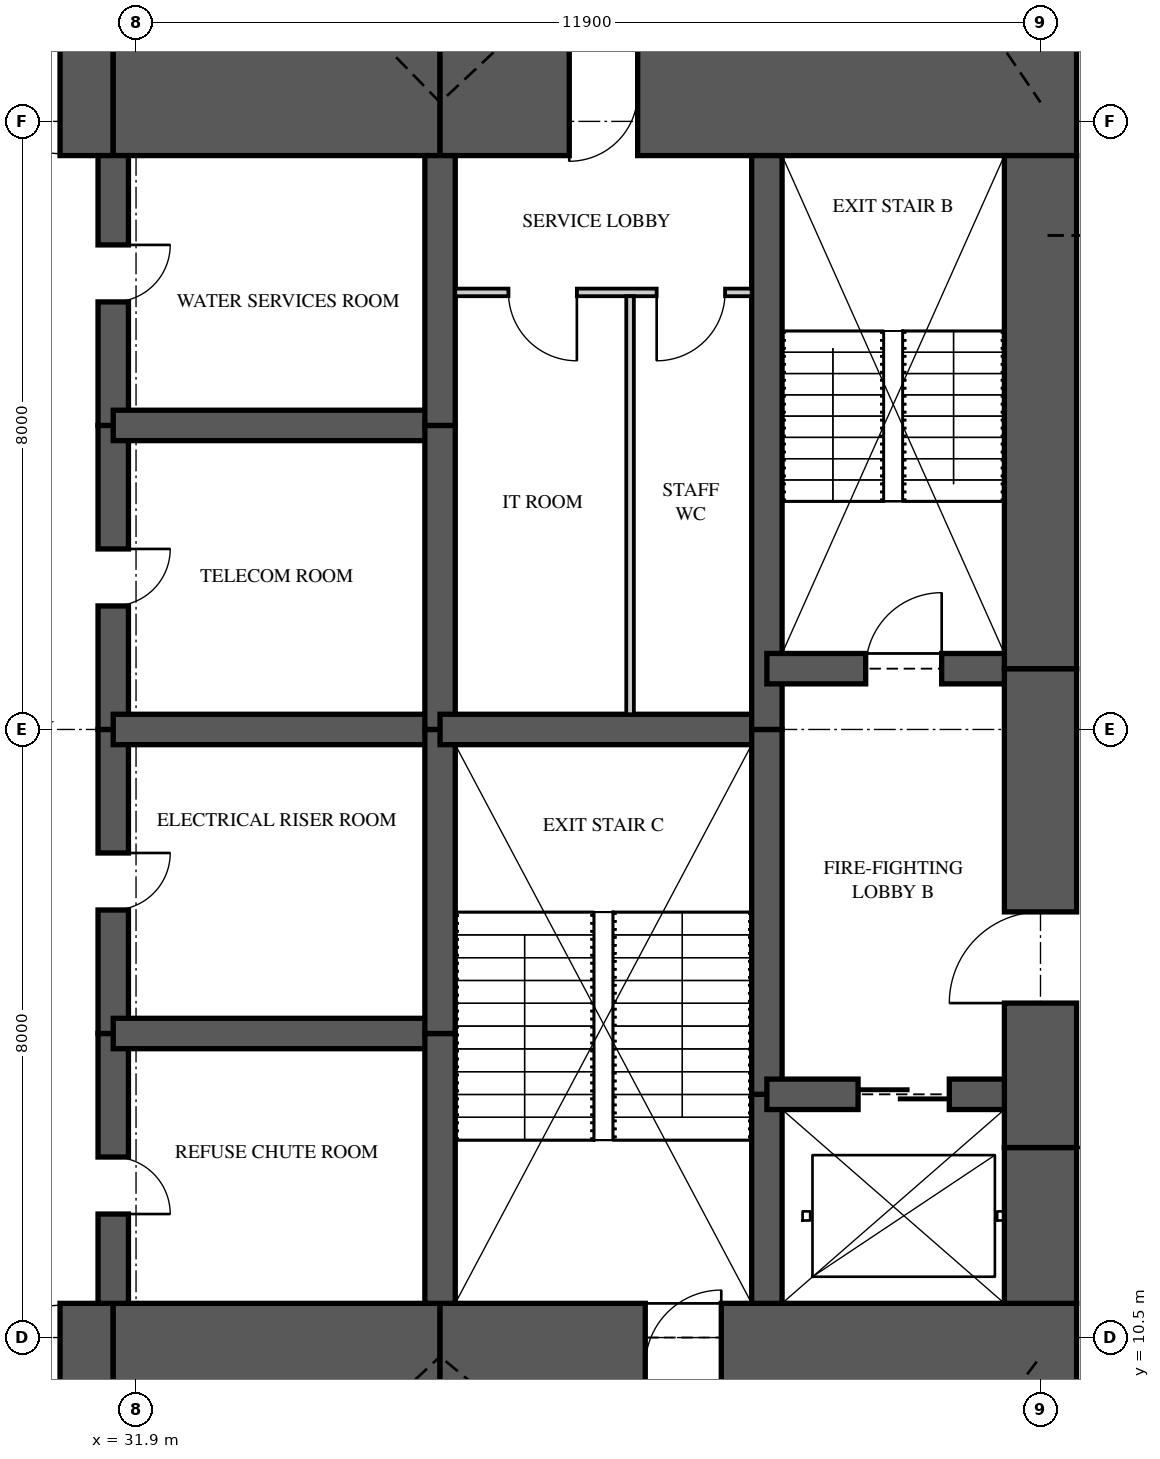
"""IFC4 building model, lengths in metres.
Left out: names, types, materials, properties, quantities, classifications, styles, units other than length and angle.
Written with IfcOpenShell. Run it as: python <this file> out.ifc"""

import sys

from ifc_helpers import new_model, si_unit, direction, frame, frame_2d, origin, place, context, subcontext, project, spatial, rectangle, extrude, element, fill, save


model = new_model("IFC4")
c1 = context("Model", 3, precision=1e-05, world=origin(), true_north=direction((0.0, 1.0)))
c2 = subcontext(c1, "Body", "Model", "MODEL_VIEW")
j1 = project(units=[si_unit("LENGTHUNIT", "METRE"), si_unit("PLANEANGLEUNIT", "RADIAN")], contexts=[c1])
p1 = place(None, origin())
s1 = spatial("IfcSite", under=j1, at=p1, CompositionType="ELEMENT")
p2 = place(p1, origin())
s2 = spatial("IfcBuilding", under=s1, at=p2, CompositionType="ELEMENT")
p3 = place(p2, frame((0.0, 0.0, 74.75)))
s3 = spatial("IfcBuildingStorey", under=s2, at=p3, CompositionType="ELEMENT", Elevation=74.75)
p4 = place(p3, frame((26.0, 10.125, 0.0), z_axis=(0.0, 0.0, 1.0), x_axis=(1.0, 0.0, 0.0)))
e1 = element("IfcWall", 1, at=p4, inside=s3, PredefinedType="SHEAR", context=c2, shape_type="SweptSolid", body=[
    extrude(rectangle(XDim=5.6, YDim=1.65, at=frame_2d((2.8, 0.0))), origin(), (0.0, 0.0, 1.0), 5.0),
])
p5 = place(p4, frame((3.3, 0.0, 0.0)))
e2 = element("IfcOpeningElement", 2, at=p5, cuts=e1, PredefinedType="OPENING", context=c2, shape_type="SweptSolid", body=[
    extrude(rectangle(XDim=1.6, YDim=2.1, at=frame_2d((0.8, 1.05))), frame((0.0, 0.835, 0.0), z_axis=(0.0, -1.0, 0.0), x_axis=(1.0, 0.0, 0.0)), (0.0, 0.0, 1.0), 1.67),
])
p6 = place(p3, frame((31.6, 10.125, 0.0), z_axis=(0.0, 0.0, 1.0), x_axis=(1.0, 0.0, 0.0)))
e3 = element("IfcWall", 3, at=p6, inside=s3, PredefinedType="SHEAR", context=c2, shape_type="SweptSolid", body=[
    extrude(rectangle(XDim=4.3, YDim=1.65, at=frame_2d((2.15, 0.0))), origin(), (0.0, 0.0, 1.0), 5.0),
])
p7 = place(p3, frame((35.9, 10.125, 0.0), z_axis=(0.0, 0.0, 1.0), x_axis=(1.0, 0.0, 0.0)))
e4 = element("IfcWall", 4, at=p7, inside=s3, PredefinedType="SHEAR", context=c2, shape_type="SweptSolid", body=[
    extrude(rectangle(XDim=8.375, YDim=1.65, at=frame_2d((4.188, 0.0))), origin(), (0.0, 0.0, 1.0), 5.0),
])
p8 = place(p7, frame((2.7, 0.0, 0.0)))
e5 = element("IfcOpeningElement", 5, at=p8, cuts=e4, PredefinedType="OPENING", context=c2, shape_type="SweptSolid", body=[
    extrude(rectangle(XDim=1.0, YDim=2.1, at=frame_2d((0.5, 1.05))), frame((0.0, 0.835, 0.0), z_axis=(0.0, -1.0, 0.0), x_axis=(1.0, 0.0, 0.0)), (0.0, 0.0, 1.0), 1.67),
])
p9 = place(p3, frame((44.275, 26.875, 0.0), z_axis=(0.0, 0.0, 1.0), x_axis=(-1.0, 0.0, 0.0)))
e6 = element("IfcWall", 6, at=p9, inside=s3, PredefinedType="SHEAR", context=c2, shape_type="SweptSolid", body=[
    extrude(rectangle(XDim=8.375, YDim=1.65, at=frame_2d((4.188, 0.0))), origin(), (0.0, 0.0, 1.0), 5.0),
])
p10 = place(p9, frame((5.775, 0.0, 0.0)))
e7 = element("IfcOpeningElement", 7, at=p10, cuts=e6, PredefinedType="OPENING", context=c2, shape_type="SweptSolid", body=[
    extrude(rectangle(XDim=0.9, YDim=2.1, at=frame_2d((0.45, 1.05))), frame((0.0, 0.835, 0.0), z_axis=(0.0, -1.0, 0.0), x_axis=(1.0, 0.0, 0.0)), (0.0, 0.0, 1.0), 1.67),
])
p11 = place(p3, frame((35.9, 26.875, 0.0), z_axis=(0.0, 0.0, 1.0), x_axis=(-1.0, 0.0, 0.0)))
e8 = element("IfcWall", 8, at=p11, inside=s3, PredefinedType="SHEAR", context=c2, shape_type="SweptSolid", body=[
    extrude(rectangle(XDim=4.3, YDim=1.65, at=frame_2d((2.15, 0.0))), origin(), (0.0, 0.0, 1.0), 5.0),
])
p12 = place(p3, frame((31.6, 26.875, 0.0), z_axis=(0.0, 0.0, 1.0), x_axis=(-1.0, 0.0, 0.0)))
e9 = element("IfcWall", 9, at=p12, inside=s3, PredefinedType="SHEAR", context=c2, shape_type="SweptSolid", body=[
    extrude(rectangle(XDim=5.6, YDim=1.65, at=frame_2d((2.8, 0.0))), origin(), (0.0, 0.0, 1.0), 5.0),
])
p13 = place(p12, frame((0.7, 0.0, 0.0)))
e10 = element("IfcOpeningElement", 10, at=p13, cuts=e9, PredefinedType="OPENING", context=c2, shape_type="SweptSolid", body=[
    extrude(rectangle(XDim=1.6, YDim=2.1, at=frame_2d((0.8, 1.05))), frame((0.0, 0.835, 0.0), z_axis=(0.0, -1.0, 0.0), x_axis=(1.0, 0.0, 0.0)), (0.0, 0.0, 1.0), 1.67),
])
p14 = place(p3, frame((43.8, 10.95, 0.0), z_axis=(0.0, 0.0, 1.0), x_axis=(0.0, 1.0, 0.0)))
e11 = element("IfcWall", 11, at=p14, inside=s3, PredefinedType="SHEAR", context=c2, shape_type="SweptSolid", body=[
    extrude(rectangle(XDim=2.05, YDim=0.95, at=frame_2d((1.025, 0.0))), origin(), (0.0, 0.0, 1.0), 5.0),
])
p15 = place(p3, frame((43.8, 13.0, 0.0), z_axis=(0.0, 0.0, 1.0), x_axis=(0.0, 1.0, 0.0)))
e12 = element("IfcWall", 12, at=p15, inside=s3, PredefinedType="SHEAR", context=c2, shape_type="SweptSolid", body=[
    extrude(rectangle(XDim=6.3, YDim=0.95, at=frame_2d((3.15, 0.0))), origin(), (0.0, 0.0, 1.0), 5.0),
])
p16 = place(p15, frame((1.9, 0.0, 0.0)))
e13 = element("IfcOpeningElement", 13, at=p16, cuts=e12, PredefinedType="OPENING", context=c2, shape_type="SweptSolid", body=[
    extrude(rectangle(XDim=1.2, YDim=2.2, at=frame_2d((0.6, 1.1))), frame((0.0, 0.485, 0.0), z_axis=(0.0, -1.0, 0.0), x_axis=(1.0, 0.0, 0.0)), (0.0, 0.0, 1.0), 0.97),
])
p17 = place(p3, frame((43.8, 19.3, 0.0), z_axis=(0.0, 0.0, 1.0), x_axis=(0.0, 1.0, 0.0)))
e14 = element("IfcWall", 14, at=p17, inside=s3, PredefinedType="SHEAR", context=c2, shape_type="SweptSolid", body=[
    extrude(rectangle(XDim=6.75, YDim=0.95, at=frame_2d((3.375, 0.0))), origin(), (0.0, 0.0, 1.0), 5.0),
])
p18 = place(p3, frame((31.6, 10.95, 0.0), z_axis=(0.0, 0.0, 1.0), x_axis=(0.0, 1.0, 0.0)))
e15 = element("IfcWall", 15, at=p18, inside=s3, PredefinedType="SHEAR", context=c2, shape_type="SweptSolid", body=[
    extrude(rectangle(XDim=3.55, YDim=0.4, at=frame_2d((1.775, 0.0))), origin(), (0.0, 0.0, 1.0), 5.0),
])
p19 = place(p18, frame((1.175, 0.0, 0.0)))
e16 = element("IfcOpeningElement", 16, at=p19, cuts=e15, PredefinedType="OPENING", context=c2, shape_type="SweptSolid", body=[
    extrude(rectangle(XDim=0.75, YDim=2.1, at=frame_2d((0.375, 1.05))), frame((0.0, 0.21, 0.0), z_axis=(0.0, -1.0, 0.0), x_axis=(1.0, 0.0, 0.0)), (0.0, 0.0, 1.0), 0.42),
])
p20 = place(p3, frame((31.6, 14.5, 0.0), z_axis=(0.0, 0.0, 1.0), x_axis=(0.0, 1.0, 0.0)))
e17 = element("IfcWall", 17, at=p20, inside=s3, PredefinedType="SHEAR", context=c2, shape_type="SweptSolid", body=[
    extrude(rectangle(XDim=4.0, YDim=0.4, at=frame_2d((2.0, 0.0))), origin(), (0.0, 0.0, 1.0), 5.0),
])
p21 = place(p20, frame((1.625, 0.0, 0.0)))
e18 = element("IfcOpeningElement", 18, at=p21, cuts=e17, PredefinedType="OPENING", context=c2, shape_type="SweptSolid", body=[
    extrude(rectangle(XDim=0.75, YDim=2.1, at=frame_2d((0.375, 1.05))), frame((0.0, 0.21, 0.0), z_axis=(0.0, -1.0, 0.0), x_axis=(1.0, 0.0, 0.0)), (0.0, 0.0, 1.0), 0.42),
])
p22 = place(p3, frame((31.6, 18.5, 0.0), z_axis=(0.0, 0.0, 1.0), x_axis=(0.0, 1.0, 0.0)))
e19 = element("IfcWall", 19, at=p22, inside=s3, PredefinedType="SHEAR", context=c2, shape_type="SweptSolid", body=[
    extrude(rectangle(XDim=4.0, YDim=0.4, at=frame_2d((2.0, 0.0))), origin(), (0.0, 0.0, 1.0), 5.0),
])
p23 = place(p22, frame((1.625, 0.0, 0.0)))
e20 = element("IfcOpeningElement", 20, at=p23, cuts=e19, PredefinedType="OPENING", context=c2, shape_type="SweptSolid", body=[
    extrude(rectangle(XDim=0.75, YDim=2.1, at=frame_2d((0.375, 1.05))), frame((0.0, 0.21, 0.0), z_axis=(0.0, -1.0, 0.0), x_axis=(1.0, 0.0, 0.0)), (0.0, 0.0, 1.0), 0.42),
])
p24 = place(p3, frame((31.6, 22.5, 0.0), z_axis=(0.0, 0.0, 1.0), x_axis=(0.0, 1.0, 0.0)))
e21 = element("IfcWall", 21, at=p24, inside=s3, PredefinedType="SHEAR", context=c2, shape_type="SweptSolid", body=[
    extrude(rectangle(XDim=3.55, YDim=0.4, at=frame_2d((1.775, 0.0))), origin(), (0.0, 0.0, 1.0), 5.0),
])
p25 = place(p24, frame((1.625, 0.0, 0.0)))
e22 = element("IfcOpeningElement", 22, at=p25, cuts=e21, PredefinedType="OPENING", context=c2, shape_type="SweptSolid", body=[
    extrude(rectangle(XDim=0.75, YDim=2.1, at=frame_2d((0.375, 1.05))), frame((0.0, 0.21, 0.0), z_axis=(0.0, -1.0, 0.0), x_axis=(1.0, 0.0, 0.0)), (0.0, 0.0, 1.0), 0.42),
])
p26 = place(p3, frame((35.9, 10.95, 0.0), z_axis=(0.0, 0.0, 1.0), x_axis=(0.0, 1.0, 0.0)))
e23 = element("IfcWall", 23, at=p26, inside=s3, PredefinedType="SHEAR", context=c2, shape_type="SweptSolid", body=[
    extrude(rectangle(XDim=3.55, YDim=0.4, at=frame_2d((1.775, 0.0))), origin(), (0.0, 0.0, 1.0), 5.0),
])
for number, where, z_axis, x_axis in (
    (24, (35.9, 14.5, 0.0), (0.0, 0.0, 1.0), (0.0, 1.0, 0.0)),
    (25, (35.9, 18.5, 0.0), (0.0, 0.0, 1.0), (0.0, 1.0, 0.0)),
):
    element("IfcWall", number, at=place(p3, frame(where, z_axis=z_axis, x_axis=x_axis)), inside=s3, PredefinedType="SHEAR", context=c2, shape_type="SweptSolid", body=[
        extrude(rectangle(XDim=4.0, YDim=0.4, at=frame_2d((2.0, 0.0))), origin(), (0.0, 0.0, 1.0), 5.0),
    ])
p27 = place(p3, frame((35.9, 22.5, 0.0), z_axis=(0.0, 0.0, 1.0), x_axis=(0.0, 1.0, 0.0)))
e26 = element("IfcWall", 26, at=p27, inside=s3, PredefinedType="SHEAR", context=c2, shape_type="SweptSolid", body=[
    extrude(rectangle(XDim=3.55, YDim=0.4, at=frame_2d((1.775, 0.0))), origin(), (0.0, 0.0, 1.0), 5.0),
])
p28 = place(p3, frame((40.2, 10.95, 0.0), z_axis=(0.0, 0.0, 1.0), x_axis=(0.0, 1.0, 0.0)))
e27 = element("IfcWall", 27, at=p28, inside=s3, PredefinedType="SHEAR", context=c2, shape_type="SweptSolid", body=[
    extrude(rectangle(XDim=2.75, YDim=0.4, at=frame_2d((1.375, 0.0))), origin(), (0.0, 0.0, 1.0), 5.0),
])
p29 = place(p3, frame((40.2, 13.7, 0.0), z_axis=(0.0, 0.0, 1.0), x_axis=(0.0, 1.0, 0.0)))
e28 = element("IfcWall", 28, at=p29, inside=s3, PredefinedType="SHEAR", context=c2, shape_type="SweptSolid", body=[
    extrude(rectangle(XDim=4.8, YDim=0.4, at=frame_2d((2.4, 0.0))), origin(), (0.0, 0.0, 1.0), 5.0),
])
p30 = place(p3, frame((40.2, 18.5, 0.0), z_axis=(0.0, 0.0, 1.0), x_axis=(0.0, 1.0, 0.0)))
e29 = element("IfcWall", 29, at=p30, inside=s3, PredefinedType="SHEAR", context=c2, shape_type="SweptSolid", body=[
    extrude(rectangle(XDim=7.55, YDim=0.4, at=frame_2d((3.775, 0.0))), origin(), (0.0, 0.0, 1.0), 5.0),
])
for number, where, z_axis, x_axis in (
    (30, (31.6, 14.5, 0.0), (0.0, 0.0, 1.0), (1.0, 0.0, 0.0)),
    (31, (31.6, 18.5, 0.0), (0.0, 0.0, 1.0), (1.0, 0.0, 0.0)),
    (32, (31.6, 22.5, 0.0), (0.0, 0.0, 1.0), (1.0, 0.0, 0.0)),
):
    element("IfcWall", number, at=place(p3, frame(where, z_axis=z_axis, x_axis=x_axis)), inside=s3, PredefinedType="SHEAR", context=c2, shape_type="SweptSolid", body=[
        extrude(rectangle(XDim=4.3, YDim=0.4, at=frame_2d((2.15, 0.0))), origin(), (0.0, 0.0, 1.0), 5.0),
    ])
p31 = place(p3, frame((35.9, 18.5, 0.0), z_axis=(0.0, 0.0, 1.0), x_axis=(1.0, 0.0, 0.0)))
e33 = element("IfcWall", 33, at=p31, inside=s3, PredefinedType="SHEAR", context=c2, shape_type="SweptSolid", body=[
    extrude(rectangle(XDim=4.3, YDim=0.4, at=frame_2d((2.15, 0.0))), origin(), (0.0, 0.0, 1.0), 5.0),
])
p32 = place(p3, frame((40.2, 13.7, 0.0), z_axis=(0.0, 0.0, 1.0), x_axis=(1.0, 0.0, 0.0)))
e34 = element("IfcWall", 34, at=p32, inside=s3, PredefinedType="SHEAR", context=c2, shape_type="SweptSolid", body=[
    extrude(rectangle(XDim=3.6, YDim=0.4, at=frame_2d((1.8, 0.0))), origin(), (0.0, 0.0, 1.0), 5.0),
])
p33 = place(p32, frame((1.2, 0.0, 0.0)))
e35 = element("IfcOpeningElement", 35, at=p33, cuts=e34, PredefinedType="OPENING", context=c2, shape_type="SweptSolid", body=[
    extrude(rectangle(XDim=1.2, YDim=2.1, at=frame_2d((0.6, 1.05))), frame((0.0, 0.21, 0.0), z_axis=(0.0, -1.0, 0.0), x_axis=(1.0, 0.0, 0.0)), (0.0, 0.0, 1.0), 0.42),
])
p34 = place(p3, frame((40.2, 19.3, 0.0), z_axis=(0.0, 0.0, 1.0), x_axis=(1.0, 0.0, 0.0)))
e36 = element("IfcWall", 36, at=p34, inside=s3, PredefinedType="SHEAR", context=c2, shape_type="SweptSolid", body=[
    extrude(rectangle(XDim=3.6, YDim=0.4, at=frame_2d((1.8, 0.0))), origin(), (0.0, 0.0, 1.0), 5.0),
])
p35 = place(p34, frame((1.3, 0.0, 0.0)))
e37 = element("IfcOpeningElement", 37, at=p35, cuts=e36, PredefinedType="OPENING", context=c2, shape_type="SweptSolid", body=[
    extrude(rectangle(XDim=1.0, YDim=2.1, at=frame_2d((0.5, 1.05))), frame((0.0, 0.21, 0.0), z_axis=(0.0, -1.0, 0.0), x_axis=(1.0, 0.0, 0.0)), (0.0, 0.0, 1.0), 0.42),
])
p36 = place(p3, frame((36.1, 24.25, 0.0), z_axis=(0.0, 0.0, 1.0), x_axis=(1.0, 0.0, 0.0)))
e38 = element("IfcWall", 38, at=p36, inside=s3, PredefinedType="PARTITIONING", context=c2, shape_type="SweptSolid", body=[
    extrude(rectangle(XDim=3.9, YDim=0.1, at=frame_2d((1.95, 0.0))), origin(), (0.0, 0.0, 1.0), 4.72),
])
p37 = place(p36, frame((0.7, 0.0, 0.0)))
e39 = element("IfcOpeningElement", 39, at=p37, cuts=e38, PredefinedType="OPENING", context=c2, shape_type="SweptSolid", body=[
    extrude(rectangle(XDim=0.9, YDim=2.1, at=frame_2d((0.45, 1.05))), frame((0.0, 0.06, 0.0), z_axis=(0.0, -1.0, 0.0), x_axis=(1.0, 0.0, 0.0)), (0.0, 0.0, 1.0), 0.12),
])
p38 = place(p36, frame((2.65, 0.0, 0.0)))
e40 = element("IfcOpeningElement", 40, at=p38, cuts=e38, PredefinedType="OPENING", context=c2, shape_type="SweptSolid", body=[
    extrude(rectangle(XDim=0.9, YDim=2.1, at=frame_2d((0.45, 1.05))), frame((0.0, 0.06, 0.0), z_axis=(0.0, -1.0, 0.0), x_axis=(1.0, 0.0, 0.0)), (0.0, 0.0, 1.0), 0.12),
])
p39 = place(p3, frame((38.4, 18.7, 0.0), z_axis=(0.0, 0.0, 1.0), x_axis=(0.0, 1.0, 0.0)))
e41 = element("IfcWall", 41, at=p39, inside=s3, PredefinedType="PARTITIONING", context=c2, shape_type="SweptSolid", body=[
    extrude(rectangle(XDim=5.5, YDim=0.1, at=frame_2d((2.75, 0.0))), origin(), (0.0, 0.0, 1.0), 4.72),
])
p40 = place(p37, frame((0.9, 0.0, 0.0), z_axis=(0.0, 0.0, 1.0), x_axis=(-1.0, 0.0, 0.0)))
e42 = element("IfcDoor", 42, at=p40, inside=s3, OperationType="SINGLE_SWING_LEFT", PredefinedType="DOOR", context=c2, shape_type="SweptSolid", body=[
    extrude(rectangle(XDim=0.9, YDim=2.1, at=frame_2d((0.45, 1.05))), frame((0.0, 0.025, 0.0), z_axis=(0.0, -1.0, 0.0), x_axis=(1.0, 0.0, 0.0)), (0.0, 0.0, 1.0), 0.05),
])
fill(e39, e42)
p41 = place(p38, frame((0.9, 0.0, 0.0), z_axis=(0.0, 0.0, 1.0), x_axis=(-1.0, 0.0, 0.0)))
e43 = element("IfcDoor", 43, at=p41, inside=s3, OperationType="SINGLE_SWING_RIGHT", PredefinedType="DOOR", context=c2, shape_type="SweptSolid", body=[
    extrude(rectangle(XDim=0.9, YDim=2.1, at=frame_2d((0.45, 1.05))), frame((0.0, 0.025, 0.0), z_axis=(0.0, -1.0, 0.0), x_axis=(1.0, 0.0, 0.0)), (0.0, 0.0, 1.0), 0.05),
])
fill(e40, e43)
p42 = place(p35, origin())
e44 = element("IfcDoor", 44, at=p42, inside=s3, OperationType="SINGLE_SWING_RIGHT", PredefinedType="DOOR", context=c2, shape_type="SweptSolid", body=[
    extrude(rectangle(XDim=1.0, YDim=2.1, at=frame_2d((0.5, 1.05))), frame((0.0, 0.025, 0.0), z_axis=(0.0, -1.0, 0.0), x_axis=(1.0, 0.0, 0.0)), (0.0, 0.0, 1.0), 0.05),
])
fill(e37, e44)
p43 = place(p16, origin())
e45 = element("IfcDoor", 45, at=p43, inside=s3, OperationType="SINGLE_SWING_LEFT", PredefinedType="DOOR", context=c2, shape_type="SweptSolid", body=[
    extrude(rectangle(XDim=1.2, YDim=2.2, at=frame_2d((0.6, 1.1))), frame((0.0, 0.025, 0.0), z_axis=(0.0, -1.0, 0.0), x_axis=(1.0, 0.0, 0.0)), (0.0, 0.0, 1.0), 0.05),
])
fill(e13, e45)
p44 = place(p33, origin())
e46 = element("IfcDoor", 46, at=p44, inside=s3, OperationType="SLIDING_TO_LEFT", PredefinedType="DOOR", context=c2, shape_type="SweptSolid", body=[
    extrude(rectangle(XDim=1.2, YDim=2.1, at=frame_2d((0.6, 1.05))), frame((0.0, 0.025, 0.0), z_axis=(0.0, -1.0, 0.0), x_axis=(1.0, 0.0, 0.0)), (0.0, 0.0, 1.0), 0.05),
])
fill(e35, e46)
p45 = place(p5, origin())
e47 = element("IfcDoor", 47, at=p45, inside=s3, OperationType="DOUBLE_DOOR_SINGLE_SWING", PredefinedType="DOOR", context=c2, shape_type="SweptSolid", body=[
    extrude(rectangle(XDim=1.6, YDim=2.1, at=frame_2d((0.8, 1.05))), frame((0.0, 0.025, 0.0), z_axis=(0.0, -1.0, 0.0), x_axis=(1.0, 0.0, 0.0)), (0.0, 0.0, 1.0), 0.05),
])
fill(e2, e47)
p46 = place(p13, origin())
e48 = element("IfcDoor", 48, at=p46, inside=s3, OperationType="DOUBLE_DOOR_SINGLE_SWING", PredefinedType="DOOR", context=c2, shape_type="SweptSolid", body=[
    extrude(rectangle(XDim=1.6, YDim=2.1, at=frame_2d((0.8, 1.05))), frame((0.0, 0.025, 0.0), z_axis=(0.0, -1.0, 0.0), x_axis=(1.0, 0.0, 0.0)), (0.0, 0.0, 1.0), 0.05),
])
fill(e10, e48)
p47 = place(p19, frame((0.75, 0.0, 0.0), z_axis=(0.0, 0.0, 1.0), x_axis=(-1.0, 0.0, 0.0)))
e49 = element("IfcDoor", 49, at=p47, inside=s3, OperationType="SINGLE_SWING_RIGHT", PredefinedType="DOOR", context=c2, shape_type="SweptSolid", body=[
    extrude(rectangle(XDim=0.75, YDim=2.1, at=frame_2d((0.375, 1.05))), frame((0.0, 0.025, 0.0), z_axis=(0.0, -1.0, 0.0), x_axis=(1.0, 0.0, 0.0)), (0.0, 0.0, 1.0), 0.05),
])
fill(e16, e49)
p48 = place(p21, frame((0.75, 0.0, 0.0), z_axis=(0.0, 0.0, 1.0), x_axis=(-1.0, 0.0, 0.0)))
e50 = element("IfcDoor", 50, at=p48, inside=s3, OperationType="SINGLE_SWING_LEFT", PredefinedType="DOOR", context=c2, shape_type="SweptSolid", body=[
    extrude(rectangle(XDim=0.75, YDim=2.1, at=frame_2d((0.375, 1.05))), frame((0.0, 0.025, 0.0), z_axis=(0.0, -1.0, 0.0), x_axis=(1.0, 0.0, 0.0)), (0.0, 0.0, 1.0), 0.05),
])
fill(e18, e50)
p49 = place(p23, frame((0.75, 0.0, 0.0), z_axis=(0.0, 0.0, 1.0), x_axis=(-1.0, 0.0, 0.0)))
e51 = element("IfcDoor", 51, at=p49, inside=s3, OperationType="SINGLE_SWING_LEFT", PredefinedType="DOOR", context=c2, shape_type="SweptSolid", body=[
    extrude(rectangle(XDim=0.75, YDim=2.1, at=frame_2d((0.375, 1.05))), frame((0.0, 0.025, 0.0), z_axis=(0.0, -1.0, 0.0), x_axis=(1.0, 0.0, 0.0)), (0.0, 0.0, 1.0), 0.05),
])
fill(e20, e51)
p50 = place(p25, frame((0.75, 0.0, 0.0), z_axis=(0.0, 0.0, 1.0), x_axis=(-1.0, 0.0, 0.0)))
e52 = element("IfcDoor", 52, at=p50, inside=s3, OperationType="SINGLE_SWING_LEFT", PredefinedType="DOOR", context=c2, shape_type="SweptSolid", body=[
    extrude(rectangle(XDim=0.75, YDim=2.1, at=frame_2d((0.375, 1.05))), frame((0.0, 0.025, 0.0), z_axis=(0.0, -1.0, 0.0), x_axis=(1.0, 0.0, 0.0)), (0.0, 0.0, 1.0), 0.05),
])
fill(e22, e52)
p51 = place(p8, origin())
e53 = element("IfcDoor", 53, at=p51, inside=s3, OperationType="SINGLE_SWING_RIGHT", PredefinedType="DOOR", context=c2, shape_type="SweptSolid", body=[
    extrude(rectangle(XDim=1.0, YDim=2.1, at=frame_2d((0.5, 1.05))), frame((0.0, 0.025, 0.0), z_axis=(0.0, -1.0, 0.0), x_axis=(1.0, 0.0, 0.0)), (0.0, 0.0, 1.0), 0.05),
])
fill(e5, e53)
p52 = place(p10, origin())
e54 = element("IfcDoor", 54, at=p52, inside=s3, OperationType="SINGLE_SWING_RIGHT", PredefinedType="DOOR", context=c2, shape_type="SweptSolid", body=[
    extrude(rectangle(XDim=0.9, YDim=2.1, at=frame_2d((0.45, 1.05))), frame((0.0, 0.47, 0.0), z_axis=(0.0, -1.0, 0.0), x_axis=(1.0, 0.0, 0.0)), (0.0, 0.0, 1.0), 0.8),
])
fill(e7, e54)
save(model, sys.argv[1])
